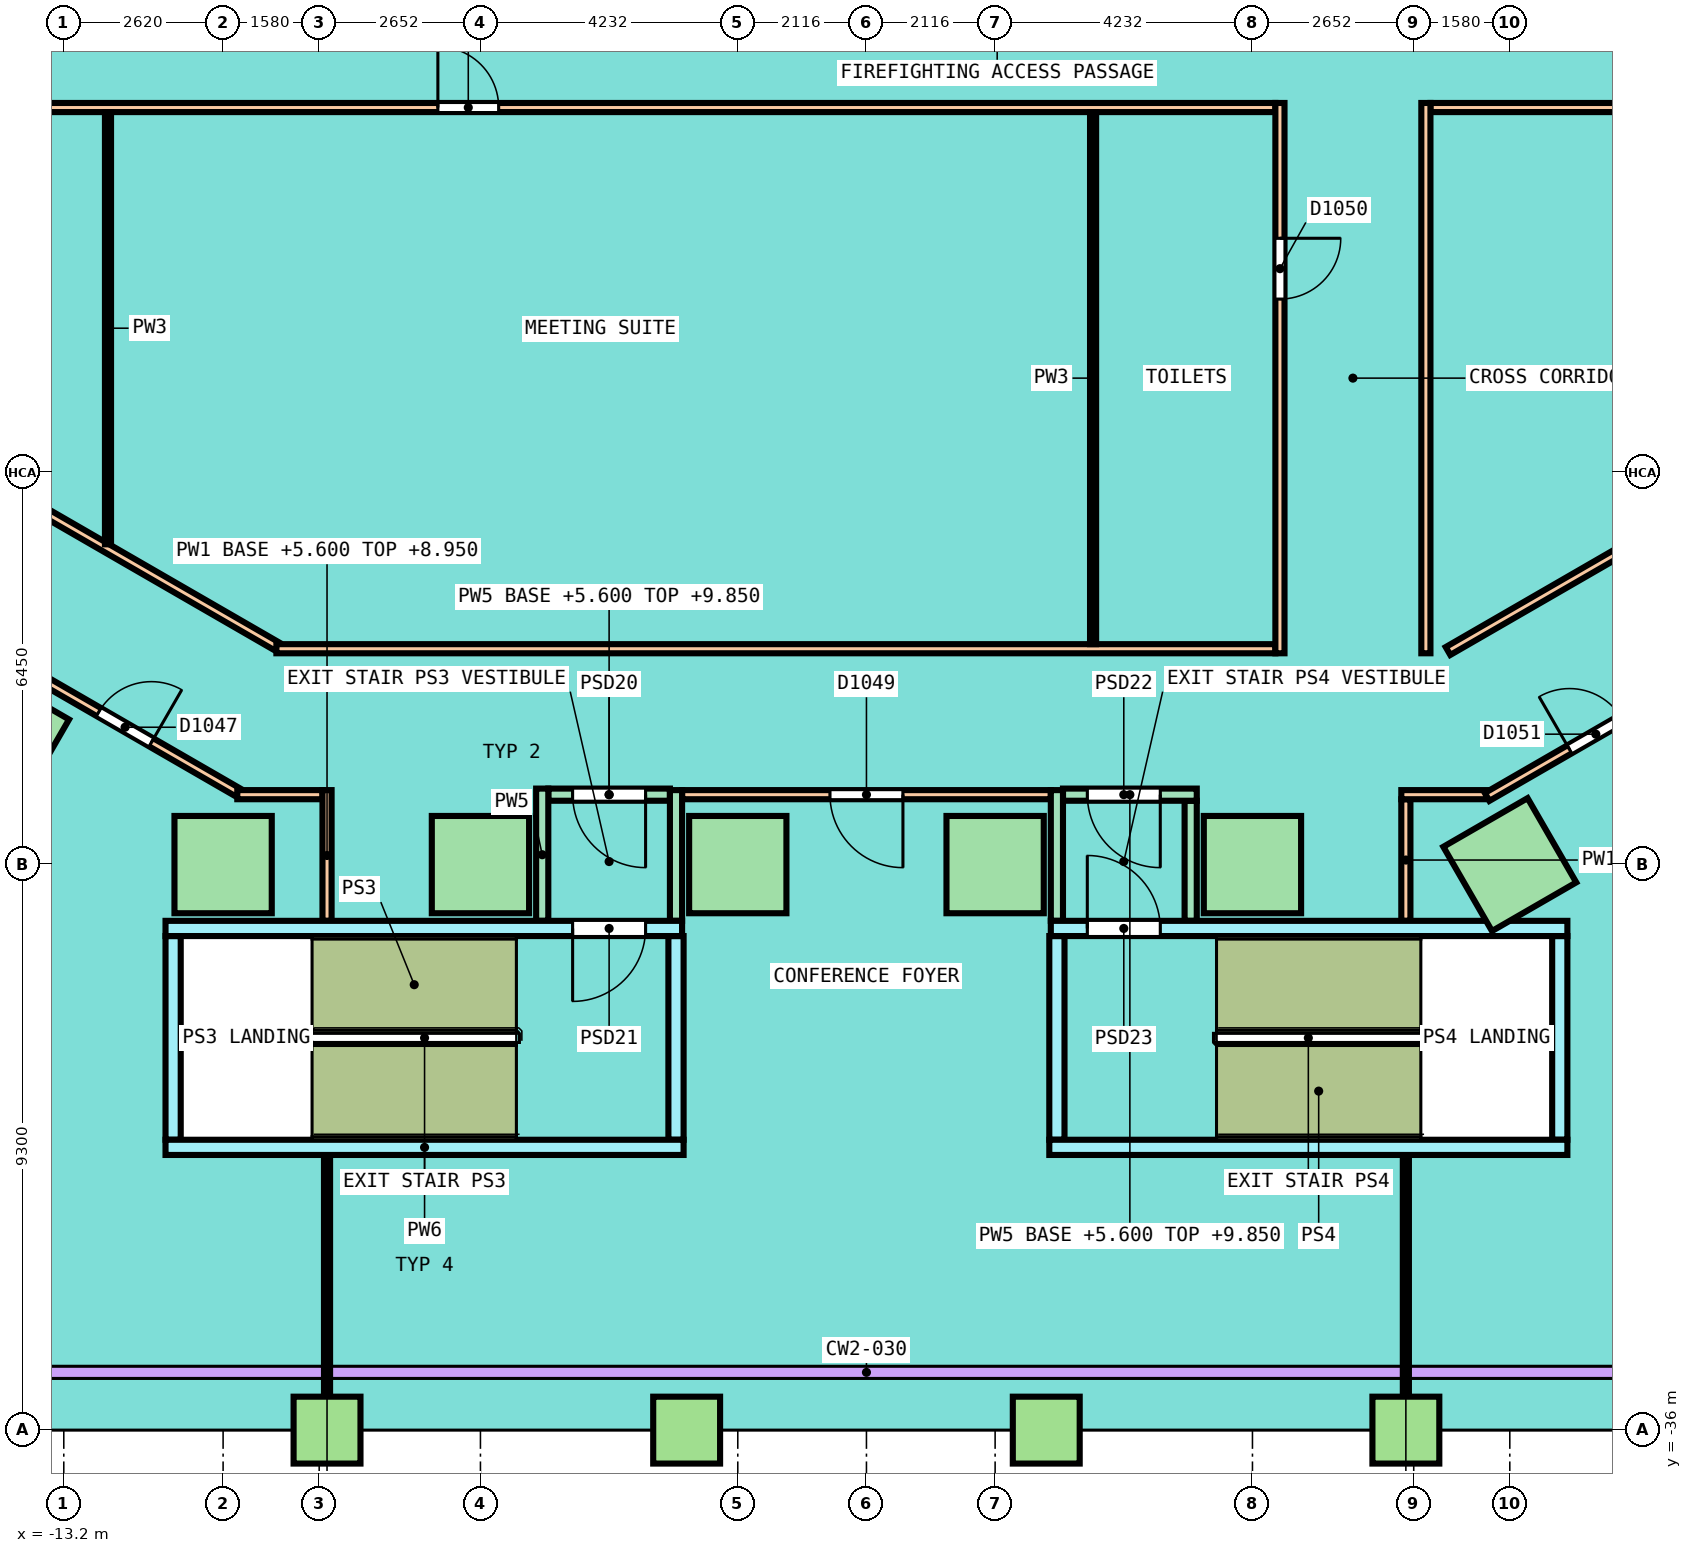
"""IFC4 building model, lengths in metres.
Left out: names, types, materials, properties, quantities, classifications, styles, units other than length and angle.
Written with IfcOpenShell. Run it as: python <this file> out.ifc"""

import sys

from ifc_helpers import new_model, si_unit, direction, frame, frame_2d, origin, origin_2d, place, context, subcontext, project, spatial, rectangle, extrude, element, fill, save


model = new_model("IFC4")
c1 = context("Model", 3, precision=1e-05, world=origin(), true_north=direction((0.0, 1.0)))
c2 = subcontext(c1, "Body", "Model", "MODEL_VIEW")
j1 = project(units=[si_unit("LENGTHUNIT", "METRE"), si_unit("PLANEANGLEUNIT", "RADIAN")], contexts=[c1])
p1 = place(None, origin())
s1 = spatial("IfcSite", under=j1, at=p1, CompositionType="ELEMENT")
p2 = place(p1, origin())
s2 = spatial("IfcBuilding", under=s1, at=p2, CompositionType="ELEMENT")
p3 = place(p2, frame((0.0, 0.0, 5.6)))
s3 = spatial("IfcBuildingStorey", under=s2, at=p3, CompositionType="ELEMENT", Elevation=5.6)
for number, where, z_axis, x_axis in (
    (1, (-14.206, -24.606, 0.0), (0.0, 0.0, 1.0), (0.866, -0.5, 0.0)),
    (2, (-10.58, -26.7, 0.0), (0.0, 0.0, 1.0), (1.0, 0.0, 0.0)),
    (3, (-6.348, -26.7, 0.0), (0.0, 0.0, 1.0), (1.0, 0.0, 0.0)),
    (4, (-2.116, -26.7, 0.0), (0.0, 0.0, 1.0), (1.0, 0.0, 0.0)),
    (5, (2.116, -26.7, 0.0), (0.0, 0.0, 1.0), (1.0, 0.0, 0.0)),
    (6, (6.348, -26.7, 0.0), (0.0, 0.0, 1.0), (1.0, 0.0, 0.0)),
    (7, (10.58, -26.7, 0.0), (0.0, 0.0, 1.0), (0.866, 0.5, 0.0)),
):
    element("IfcColumn", number, at=place(p3, frame(where, z_axis=z_axis, x_axis=x_axis)), inside=s3, PredefinedType="COLUMN", context=c2, shape_type="SweptSolid", body=[
        extrude(rectangle(XDim=1.6, YDim=1.6, at=origin_2d()), origin(), (0.0, 0.0, 1.0), 4.25),
    ])
for number, where, z_axis, x_axis in (
    (8, (-8.871, -36.0, 0.0), (0.0, 0.0, 1.0), (1.0, 0.0, 0.0)),
    (9, (-2.957, -36.0, 0.0), (0.0, 0.0, 1.0), (1.0, 0.0, 0.0)),
    (10, (2.957, -36.0, 0.0), (0.0, 0.0, 1.0), (1.0, 0.0, 0.0)),
    (11, (8.871, -36.0, 0.0), (0.0, 0.0, 1.0), (1.0, 0.0, 0.0)),
):
    element("IfcColumn", number, at=place(p3, frame(where, z_axis=z_axis, x_axis=x_axis)), inside=s3, PredefinedType="COLUMN", context=c2, shape_type="SweptSolid", body=[
        extrude(rectangle(XDim=1.1, YDim=1.1, at=origin_2d()), origin(), (0.0, 0.0, 1.0), 4.25),
    ])
p4 = place(p3, frame((8.871, -27.625, 0.0), z_axis=(0.0, 0.0, 1.0), x_axis=(0.0, 1.0, 0.0)))
e12 = element("IfcWall", 12, at=p4, inside=s3, PredefinedType="PARTITIONING", context=c2, shape_type="SweptSolid", body=[
    extrude(rectangle(XDim=2.0, YDim=0.15, at=frame_2d((1.0, 0.0))), origin(), (0.0, 0.0, 1.0), 3.35),
])
p5 = place(p3, frame((-15.299, -19.876, 0.0), z_axis=(0.0, 0.0, 1.0), x_axis=(0.866024786089, -0.500001069878, 0.0)))
e13 = element("IfcWall", 13, at=p5, inside=s3, PredefinedType="PARTITIONING", context=c2, shape_type="SweptSolid", body=[
    extrude(rectangle(XDim=6.473, YDim=0.15, at=frame_2d((3.236, 0.0))), origin(), (0.0, 0.0, 1.0), 3.2),
])
p6 = place(p3, frame((-17.056, -21.633, 0.0), z_axis=(0.0, 0.0, 1.0), x_axis=(0.866023143435, -0.50000391502, 0.0)))
e14 = element("IfcWall", 14, at=p6, inside=s3, PredefinedType="PARTITIONING", context=c2, shape_type="SweptSolid", body=[
    extrude(rectangle(XDim=7.759, YDim=0.15, at=frame_2d((3.879, 0.0))), origin(), (0.0, 0.0, 1.0), 3.2),
])
p7 = place(p6, frame((5.116, 0.0, 0.0)))
e15 = element("IfcOpeningElement", 15, at=p7, cuts=e14, PredefinedType="OPENING", context=c2, shape_type="SweptSolid", body=[
    extrude(rectangle(XDim=1.0, YDim=2.1, at=frame_2d((0.5, 1.05))), frame((0.0, 0.085, 0.0), z_axis=(0.0, -1.0, 0.0), x_axis=(1.0, 0.0, 0.0)), (0.0, 0.0, 1.0), 0.17),
])
p8 = place(p3, frame((-10.347, -25.55, 0.0), z_axis=(0.0, 0.0, 1.0), x_axis=(1.0, 0.0, 0.0)))
e16 = element("IfcWall", 16, at=p8, inside=s3, PredefinedType="PARTITIONING", context=c2, shape_type="SweptSolid", body=[
    extrude(rectangle(XDim=1.401, YDim=0.15, at=frame_2d((0.7, 0.0))), origin(), (0.0, 0.0, 1.0), 3.2),
])
p9 = place(p3, frame((-3.032, -25.55, 0.0), z_axis=(0.0, 0.0, 1.0), x_axis=(1.0, 0.0, 0.0)))
e17 = element("IfcWall", 17, at=p9, inside=s3, PredefinedType="PARTITIONING", context=c2, shape_type="SweptSolid", body=[
    extrude(rectangle(XDim=6.064, YDim=0.15, at=frame_2d((3.032, 0.0))), origin(), (0.0, 0.0, 1.0), 3.2),
])
p10 = place(p9, frame((2.432, 0.0, 0.0)))
e18 = element("IfcOpeningElement", 18, at=p10, cuts=e17, PredefinedType="OPENING", context=c2, shape_type="SweptSolid", body=[
    extrude(rectangle(XDim=1.2, YDim=2.1, at=frame_2d((0.6, 1.05))), frame((0.0, 0.085, 0.0), z_axis=(0.0, -1.0, 0.0), x_axis=(1.0, 0.0, 0.0)), (0.0, 0.0, 1.0), 0.17),
])
p11 = place(p3, frame((8.796, -25.55, 0.0), z_axis=(0.0, 0.0, 1.0), x_axis=(1.0, 0.0, 0.0)))
e19 = element("IfcWall", 19, at=p11, inside=s3, PredefinedType="PARTITIONING", context=c2, shape_type="SweptSolid", body=[
    extrude(rectangle(XDim=1.401, YDim=0.15, at=frame_2d((0.7, 0.0))), origin(), (0.0, 0.0, 1.0), 3.2),
])
p12 = place(p3, frame((-8.871, -27.625, 0.0), z_axis=(0.0, 0.0, 1.0), x_axis=(0.0, 1.0, 0.0)))
e20 = element("IfcWall", 20, at=p12, inside=s3, PredefinedType="PARTITIONING", context=c2, shape_type="SweptSolid", body=[
    extrude(rectangle(XDim=2.15, YDim=0.15, at=frame_2d((1.075, 0.0))), origin(), (0.0, 0.0, 1.0), 3.35),
])
p13 = place(p3, frame((-9.704, -23.15, 0.0), z_axis=(0.0, 0.0, 1.0), x_axis=(1.0, 0.0, 0.0)))
e21 = element("IfcWall", 21, at=p13, inside=s3, PredefinedType="PARTITIONING", context=c2, shape_type="SweptSolid", body=[
    extrude(rectangle(XDim=16.429, YDim=0.15, at=frame_2d((8.214, 0.0))), origin(), (0.0, 0.0, 1.0), 3.2),
])
p14 = place(p3, frame((10.207, -25.587, 0.0), z_axis=(0.0, 0.0, 1.0), x_axis=(0.866023143435, 0.50000391502, 0.0)))
e22 = element("IfcWall", 22, at=p14, inside=s3, PredefinedType="PARTITIONING", context=c2, shape_type="SweptSolid", body=[
    extrude(rectangle(XDim=7.759, YDim=0.15, at=frame_2d((3.879, 0.0))), origin(), (0.0, 0.0, 1.0), 3.2),
])
p15 = place(p14, frame((1.565, 0.0, 0.0)))
e23 = element("IfcOpeningElement", 23, at=p15, cuts=e22, PredefinedType="OPENING", context=c2, shape_type="SweptSolid", body=[
    extrude(rectangle(XDim=1.0, YDim=2.1, at=frame_2d((0.5, 1.05))), frame((0.0, 0.085, 0.0), z_axis=(0.0, -1.0, 0.0), x_axis=(1.0, 0.0, 0.0)), (0.0, 0.0, 1.0), 0.17),
])
p16 = place(p3, frame((9.564, -23.188, 0.0), z_axis=(0.0, 0.0, 1.0), x_axis=(0.866024786089, 0.500001069878, 0.0)))
e24 = element("IfcWall", 24, at=p16, inside=s3, PredefinedType="PARTITIONING", context=c2, shape_type="SweptSolid", body=[
    extrude(rectangle(XDim=6.473, YDim=0.15, at=frame_2d((3.236, 0.0))), origin(), (0.0, 0.0, 1.0), 3.2),
])
p17 = place(p3, frame((-16.725, -14.25, 0.0), z_axis=(0.0, 0.0, 1.0), x_axis=(1.0, 0.0, 0.0)))
e25 = element("IfcWall", 25, at=p17, inside=s3, PredefinedType="PARTITIONING", context=c2, shape_type="SweptSolid", body=[
    extrude(rectangle(XDim=23.45, YDim=0.15, at=frame_2d((11.725, 0.0))), origin(), (0.0, 0.0, 1.0), 3.2),
])
p18 = place(p17, frame((9.677, 0.0, 0.0)))
e26 = element("IfcOpeningElement", 26, at=p18, cuts=e25, PredefinedType="OPENING", context=c2, shape_type="SweptSolid", body=[
    extrude(rectangle(XDim=1.0, YDim=2.1, at=frame_2d((0.5, 1.05))), frame((0.0, 0.085, 0.0), z_axis=(0.0, -1.0, 0.0), x_axis=(1.0, 0.0, 0.0)), (0.0, 0.0, 1.0), 0.17),
])
p19 = place(p3, frame((9.275, -14.25, 0.0), z_axis=(0.0, 0.0, 1.0), x_axis=(1.0, 0.0, 0.0)))
e27 = element("IfcWall", 27, at=p19, inside=s3, PredefinedType="PARTITIONING", context=c2, shape_type="SweptSolid", body=[
    extrude(rectangle(XDim=7.45, YDim=0.15, at=frame_2d((3.725, 0.0))), origin(), (0.0, 0.0, 1.0), 3.2),
])
p20 = place(p3, frame((6.8, -23.225, 0.0), z_axis=(0.0, 0.0, 1.0), x_axis=(0.0, 1.0, 0.0)))
e28 = element("IfcWall", 28, at=p20, inside=s3, PredefinedType="PARTITIONING", context=c2, shape_type="SweptSolid", body=[
    extrude(rectangle(XDim=9.05, YDim=0.15, at=frame_2d((4.525, 0.0))), origin(), (0.0, 0.0, 1.0), 3.2),
])
p21 = place(p20, frame((5.825, 0.0, 0.0)))
e29 = element("IfcOpeningElement", 29, at=p21, cuts=e28, PredefinedType="OPENING", context=c2, shape_type="SweptSolid", body=[
    extrude(rectangle(XDim=1.0, YDim=2.1, at=frame_2d((0.5, 1.05))), frame((0.0, 0.085, 0.0), z_axis=(0.0, -1.0, 0.0), x_axis=(1.0, 0.0, 0.0)), (0.0, 0.0, 1.0), 0.17),
])
p22 = place(p3, frame((9.2, -23.225, 0.0), z_axis=(0.0, 0.0, 1.0), x_axis=(0.0, 1.0, 0.0)))
e30 = element("IfcWall", 30, at=p22, inside=s3, PredefinedType="PARTITIONING", context=c2, shape_type="SweptSolid", body=[
    extrude(rectangle(XDim=9.05, YDim=0.15, at=frame_2d((4.525, 0.0))), origin(), (0.0, 0.0, 1.0), 3.2),
])
p23 = place(p3, frame((5.332, -27.625, 0.0), z_axis=(0.0, 0.0, 1.0), x_axis=(0.0, 1.0, 0.0)))
e31 = element("IfcWall", 31, at=p23, inside=s3, PredefinedType="PARTITIONING", context=c2, shape_type="SweptSolid", body=[
    extrude(rectangle(XDim=1.975, YDim=0.2, at=frame_2d((0.988, 0.0))), origin(), (0.0, 0.0, 1.0), 3.35),
])
p24 = place(p3, frame((-5.232, -25.55, 0.0), z_axis=(0.0, 0.0, 1.0), x_axis=(1.0, 0.0, 0.0)))
e32 = element("IfcWall", 32, at=p24, inside=s3, PredefinedType="PARTITIONING", context=c2, shape_type="SweptSolid", body=[
    extrude(rectangle(XDim=2.0, YDim=0.2, at=frame_2d((1.0, 0.0))), origin(), (0.0, 0.0, 1.0), 4.25),
])
p25 = place(p24, frame((1.6, 0.0, 0.0), z_axis=(0.0, 0.0, 1.0), x_axis=(-1.0, 0.0, 0.0)))
e33 = element("IfcOpeningElement", 33, at=p25, cuts=e32, PredefinedType="OPENING", context=c2, shape_type="SweptSolid", body=[
    extrude(rectangle(XDim=1.2, YDim=2.1, at=frame_2d((0.6, 1.05))), frame((0.0, 0.11, 0.0), z_axis=(0.0, -1.0, 0.0), x_axis=(1.0, 0.0, 0.0)), (0.0, 0.0, 1.0), 0.22),
])
p26 = place(p3, frame((3.232, -25.55, 0.0), z_axis=(0.0, 0.0, 1.0), x_axis=(1.0, 0.0, 0.0)))
e34 = element("IfcWall", 34, at=p26, inside=s3, PredefinedType="PARTITIONING", context=c2, shape_type="SweptSolid", body=[
    extrude(rectangle(XDim=2.2, YDim=0.2, at=frame_2d((1.1, 0.0))), origin(), (0.0, 0.0, 1.0), 4.25),
])
p27 = place(p26, frame((1.6, 0.0, 0.0), z_axis=(0.0, 0.0, 1.0), x_axis=(-1.0, 0.0, 0.0)))
e35 = element("IfcOpeningElement", 35, at=p27, cuts=e34, PredefinedType="OPENING", context=c2, shape_type="SweptSolid", body=[
    extrude(rectangle(XDim=1.2, YDim=2.1, at=frame_2d((0.6, 1.05))), frame((0.0, 0.11, 0.0), z_axis=(0.0, -1.0, 0.0), x_axis=(1.0, 0.0, 0.0)), (0.0, 0.0, 1.0), 0.22),
])
p28 = place(p3, frame((-5.332, -27.625, 0.0), z_axis=(0.0, 0.0, 1.0), x_axis=(0.0, 1.0, 0.0)))
e36 = element("IfcWall", 36, at=p28, inside=s3, PredefinedType="PARTITIONING", context=c2, shape_type="SweptSolid", body=[
    extrude(rectangle(XDim=2.175, YDim=0.2, at=frame_2d((1.087, 0.0))), origin(), (0.0, 0.0, 1.0), 3.35),
])
for number, where, z_axis, x_axis in (
    (37, (-3.132, -27.625, 0.0), (0.0, 0.0, 1.0), (0.0, 1.0, 0.0)),
    (38, (3.132, -27.625, 0.0), (0.0, 0.0, 1.0), (0.0, 1.0, 0.0)),
):
    element("IfcWall", number, at=place(p3, frame(where, z_axis=z_axis, x_axis=x_axis)), inside=s3, PredefinedType="PARTITIONING", context=c2, shape_type="SweptSolid", body=[
        extrude(rectangle(XDim=2.15, YDim=0.2, at=frame_2d((1.075, 0.0))), origin(), (0.0, 0.0, 1.0), 3.35),
    ])
p29 = place(p3, frame((8.871, -35.8, 0.0), z_axis=(0.0, 0.0, 1.0), x_axis=(0.0, 1.0, 0.0)))
e39 = element("IfcWall", 39, at=p29, inside=s3, PredefinedType="PARTITIONING", context=c2, shape_type="SweptSolid", body=[
    extrude(rectangle(XDim=4.325, YDim=0.1, at=frame_2d((2.163, 0.0))), origin(), (0.0, 0.0, 1.0), 4.25),
])
p30 = place(p3, frame((-12.473, -21.433, 0.0), z_axis=(0.0, 0.0, 1.0), x_axis=(0.0, 1.0, 0.0)))
e40 = element("IfcWall", 40, at=p30, inside=s3, PredefinedType="PARTITIONING", context=c2, shape_type="SweptSolid", body=[
    extrude(rectangle(XDim=7.108, YDim=0.1, at=frame_2d((3.554, 0.0))), origin(), (0.0, 0.0, 1.0), 3.2),
])
p31 = place(p3, frame((-8.871, -35.8, 0.0), z_axis=(0.0, 0.0, 1.0), x_axis=(0.0, 1.0, 0.0)))
e41 = element("IfcWall", 41, at=p31, inside=s3, PredefinedType="PARTITIONING", context=c2, shape_type="SweptSolid", body=[
    extrude(rectangle(XDim=4.325, YDim=0.1, at=frame_2d((2.163, 0.0))), origin(), (0.0, 0.0, 1.0), 4.25),
])
p32 = place(p3, frame((3.727, -23.075, 0.0), z_axis=(0.0, 0.0, 1.0), x_axis=(0.0, 1.0, 0.0)))
e42 = element("IfcWall", 42, at=p32, inside=s3, PredefinedType="PARTITIONING", context=c2, shape_type="SweptSolid", body=[
    extrude(rectangle(XDim=8.75, YDim=0.1, at=frame_2d((4.375, 0.0))), origin(), (0.0, 0.0, 1.0), 3.2),
])
for number, where, z_axis, x_axis in (
    (43, (-11.402, -31.225, 0.0), (0.0, 0.0, 1.0), (0.0, 1.0, 0.0)),
    (44, (-3.132, -31.225, 0.0), (0.0, 0.0, 1.0), (0.0, 1.0, 0.0)),
    (45, (3.132, -31.225, 0.0), (0.0, 0.0, 1.0), (0.0, 1.0, 0.0)),
    (46, (11.402, -31.225, 0.0), (0.0, 0.0, 1.0), (0.0, 1.0, 0.0)),
):
    element("IfcWall", number, at=place(p3, frame(where, z_axis=z_axis, x_axis=x_axis)), inside=s3, PredefinedType="SOLIDWALL", context=c2, shape_type="SweptSolid", body=[
        extrude(rectangle(XDim=3.35, YDim=0.25, at=frame_2d((1.675, 0.0))), origin(), (0.0, 0.0, 1.0), 4.25),
    ])
p33 = place(p3, frame((-11.527, -27.75, 0.0), z_axis=(0.0, 0.0, 1.0), x_axis=(1.0, 0.0, 0.0)))
e47 = element("IfcWall", 47, at=p33, inside=s3, PredefinedType="SOLIDWALL", context=c2, shape_type="SweptSolid", body=[
    extrude(rectangle(XDim=8.495, YDim=0.25, at=frame_2d((4.248, 0.0))), origin(), (0.0, 0.0, 1.0), 4.25),
])
p34 = place(p33, frame((7.895, 0.0, 0.0), z_axis=(0.0, 0.0, 1.0), x_axis=(-1.0, 0.0, 0.0)))
e48 = element("IfcOpeningElement", 48, at=p34, cuts=e47, PredefinedType="OPENING", context=c2, shape_type="SweptSolid", body=[
    extrude(rectangle(XDim=1.2, YDim=2.1, at=frame_2d((0.6, 1.05))), frame((0.0, 0.135, 0.0), z_axis=(0.0, -1.0, 0.0), x_axis=(1.0, 0.0, 0.0)), (0.0, 0.0, 1.0), 0.27),
])
p35 = place(p3, frame((3.032, -27.75, 0.0), z_axis=(0.0, 0.0, 1.0), x_axis=(1.0, 0.0, 0.0)))
e49 = element("IfcWall", 49, at=p35, inside=s3, PredefinedType="SOLIDWALL", context=c2, shape_type="SweptSolid", body=[
    extrude(rectangle(XDim=8.495, YDim=0.25, at=frame_2d((4.248, 0.0))), origin(), (0.0, 0.0, 1.0), 4.25),
])
p36 = place(p35, frame((1.8, 0.0, 0.0), z_axis=(0.0, 0.0, 1.0), x_axis=(-1.0, 0.0, 0.0)))
e50 = element("IfcOpeningElement", 50, at=p36, cuts=e49, PredefinedType="OPENING", context=c2, shape_type="SweptSolid", body=[
    extrude(rectangle(XDim=1.2, YDim=2.1, at=frame_2d((0.6, 1.05))), frame((0.0, 0.135, 0.0), z_axis=(0.0, -1.0, 0.0), x_axis=(1.0, 0.0, 0.0)), (0.0, 0.0, 1.0), 0.27),
])
for number, where, z_axis, x_axis in (
    (51, (-11.527, -31.35, 0.0), (0.0, 0.0, 1.0), (1.0, 0.0, 0.0)),
    (52, (3.007, -31.35, 0.0), (0.0, 0.0, 1.0), (1.0, 0.0, 0.0)),
):
    element("IfcWall", number, at=place(p3, frame(where, z_axis=z_axis, x_axis=x_axis)), inside=s3, PredefinedType="SOLIDWALL", context=c2, shape_type="SweptSolid", body=[
        extrude(rectangle(XDim=8.52, YDim=0.25, at=frame_2d((4.26, 0.0))), origin(), (0.0, 0.0, 1.0), 4.25),
    ])
p37 = place(p7, origin())
e53 = element("IfcDoor", 53, at=p37, inside=s3, OperationType="SINGLE_SWING_RIGHT", PredefinedType="DOOR", context=c2, shape_type="SweptSolid", body=[
    extrude(rectangle(XDim=1.0, YDim=2.1, at=frame_2d((0.5, 1.05))), frame((0.0, 0.025, 0.0), z_axis=(0.0, -1.0, 0.0), x_axis=(1.0, 0.0, 0.0)), (0.0, 0.0, 1.0), 0.05),
])
fill(e15, e53)
p38 = place(p18, origin())
e54 = element("IfcDoor", 54, at=p38, inside=s3, OperationType="SINGLE_SWING_LEFT", PredefinedType="DOOR", context=c2, shape_type="SweptSolid", body=[
    extrude(rectangle(XDim=1.0, YDim=2.1, at=frame_2d((0.5, 1.05))), frame((0.0, 0.025, 0.0), z_axis=(0.0, -1.0, 0.0), x_axis=(1.0, 0.0, 0.0)), (0.0, 0.0, 1.0), 0.05),
])
fill(e26, e54)
p39 = place(p10, origin())
e55 = element("IfcDoor", 55, at=p39, inside=s3, OperationType="DOUBLE_DOOR_SINGLE_SWING", PredefinedType="DOOR", context=c2, shape_type="SweptSolid", body=[
    extrude(rectangle(XDim=1.2, YDim=2.1, at=frame_2d((0.6, 1.05))), frame((0.0, 0.025, 0.0), z_axis=(0.0, -1.0, 0.0), x_axis=(1.0, 0.0, 0.0)), (0.0, 0.0, 1.0), 0.05),
])
fill(e18, e55)
p40 = place(p21, origin())
e56 = element("IfcDoor", 56, at=p40, inside=s3, OperationType="SINGLE_SWING_LEFT", PredefinedType="DOOR", context=c2, shape_type="SweptSolid", body=[
    extrude(rectangle(XDim=1.0, YDim=2.1, at=frame_2d((0.5, 1.05))), frame((0.0, 0.025, 0.0), z_axis=(0.0, -1.0, 0.0), x_axis=(1.0, 0.0, 0.0)), (0.0, 0.0, 1.0), 0.05),
])
fill(e29, e56)
p41 = place(p15, origin())
e57 = element("IfcDoor", 57, at=p41, inside=s3, OperationType="SINGLE_SWING_RIGHT", PredefinedType="DOOR", context=c2, shape_type="SweptSolid", body=[
    extrude(rectangle(XDim=1.0, YDim=2.1, at=frame_2d((0.5, 1.05))), frame((0.0, 0.025, 0.0), z_axis=(0.0, -1.0, 0.0), x_axis=(1.0, 0.0, 0.0)), (0.0, 0.0, 1.0), 0.05),
])
fill(e23, e57)
p42 = place(p25, origin())
e58 = element("IfcDoor", 58, at=p42, inside=s3, OperationType="SINGLE_SWING_LEFT", PredefinedType="DOOR", context=c2, shape_type="SweptSolid", body=[
    extrude(rectangle(XDim=1.2, YDim=2.1, at=frame_2d((0.6, 1.05))), frame((0.0, 0.025, 0.0), z_axis=(0.0, -1.0, 0.0), x_axis=(1.0, 0.0, 0.0)), (0.0, 0.0, 1.0), 0.05),
])
fill(e33, e58)
p43 = place(p34, origin())
e59 = element("IfcDoor", 59, at=p43, inside=s3, OperationType="SINGLE_SWING_RIGHT", PredefinedType="DOOR", context=c2, shape_type="SweptSolid", body=[
    extrude(rectangle(XDim=1.2, YDim=2.1, at=frame_2d((0.6, 1.05))), frame((0.0, 0.025, 0.0), z_axis=(0.0, -1.0, 0.0), x_axis=(1.0, 0.0, 0.0)), (0.0, 0.0, 1.0), 0.05),
])
fill(e48, e59)
p44 = place(p27, origin())
e60 = element("IfcDoor", 60, at=p44, inside=s3, OperationType="SINGLE_SWING_LEFT", PredefinedType="DOOR", context=c2, shape_type="SweptSolid", body=[
    extrude(rectangle(XDim=1.2, YDim=2.1, at=frame_2d((0.6, 1.05))), frame((0.0, 0.025, 0.0), z_axis=(0.0, -1.0, 0.0), x_axis=(1.0, 0.0, 0.0)), (0.0, 0.0, 1.0), 0.05),
])
fill(e35, e60)
p45 = place(p36, origin())
e61 = element("IfcDoor", 61, at=p45, inside=s3, OperationType="SINGLE_SWING_RIGHT", PredefinedType="DOOR", context=c2, shape_type="SweptSolid", body=[
    extrude(rectangle(XDim=1.2, YDim=2.1, at=frame_2d((0.6, 1.05))), frame((0.0, 0.025, 0.0), z_axis=(0.0, -1.0, 0.0), x_axis=(1.0, 0.0, 0.0)), (0.0, 0.0, 1.0), 0.05),
])
fill(e50, e61)
save(model, sys.argv[1])
